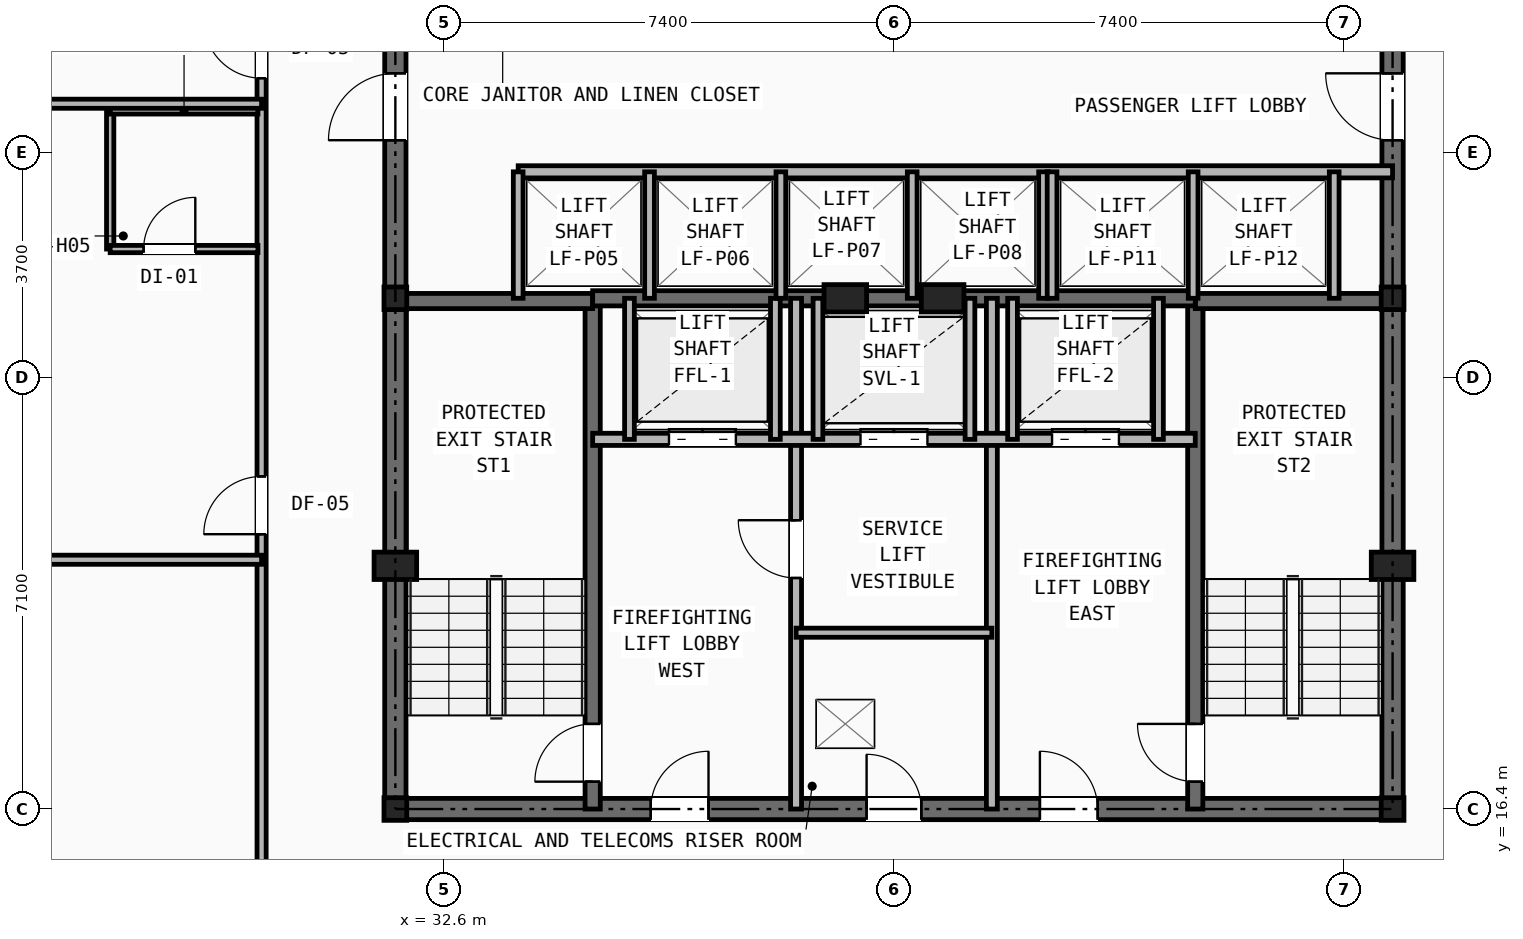
"""IFC4 building model, lengths in metres.
Left out: names, types, materials, properties, quantities, classifications, styles, units other than length and angle.
Written with IfcOpenShell. Run it as: python <this file> out.ifc"""

import sys

from ifc_helpers import new_model, si_unit, direction, frame, frame_2d, origin, origin_2d, place, context, subcontext, project, spatial, rectangle, i_section, extrude, element, fill, save


model = new_model("IFC4")
c1 = context("Model", 3, precision=1e-05, world=origin(), true_north=direction((0.0, 1.0)))
c2 = subcontext(c1, "Body", "Model", "MODEL_VIEW")
j1 = project(units=[si_unit("LENGTHUNIT", "METRE"), si_unit("PLANEANGLEUNIT", "RADIAN")], contexts=[c1])
p1 = place(None, origin())
s1 = spatial("IfcSite", under=j1, at=p1, CompositionType="ELEMENT")
p2 = place(p1, origin())
s2 = spatial("IfcBuilding", under=s1, at=p2, CompositionType="ELEMENT")
p3 = place(p2, frame((0.0, 0.0, 30.4)))
s3 = spatial("IfcBuildingStorey", under=s2, at=p3, CompositionType="ELEMENT", Elevation=30.4)
for number, where, z_axis, x_axis in (
    (1, (31.8, 16.4, 0.0), (0.0, 0.0, 1.0), (1.0, 0.0, 0.0)),
    (2, (48.2, 16.4, 0.0), (0.0, 0.0, 1.0), (1.0, 0.0, 0.0)),
    (3, (31.8, 24.8, 0.0), (0.0, 0.0, 1.0), (1.0, 0.0, 0.0)),
    (4, (48.2, 24.8, 0.0), (0.0, 0.0, 1.0), (1.0, 0.0, 0.0)),
):
    element("IfcColumn", number, at=place(p3, frame(where, z_axis=z_axis, x_axis=x_axis)), inside=s3, PredefinedType="COLUMN", context=c2, shape_type="SweptSolid", body=[
        extrude(i_section(OverallWidth=0.374, OverallDepth=0.372, WebThickness=0.016, FlangeThickness=0.026, at=origin_2d()), origin(), (0.0, 0.0, 1.0), 3.2),
    ])
for number, where, z_axis, x_axis in (
    (5, (31.8, 20.4, 0.0), (0.0, 0.0, 1.0), (1.0, 0.0, 0.0)),
    (6, (48.2, 20.4, 0.0), (0.0, 0.0, 1.0), (1.0, 0.0, 0.0)),
    (7, (39.2, 24.8, 0.0), (0.0, 0.0, 1.0), (1.0, 0.0, 0.0)),
    (8, (40.8, 24.8, 0.0), (0.0, 0.0, 1.0), (1.0, 0.0, 0.0)),
):
    element("IfcColumn", number, at=place(p3, frame(where, z_axis=z_axis, x_axis=x_axis)), inside=s3, PredefinedType="PILASTER", context=c2, shape_type="SweptSolid", body=[
        extrude(rectangle(XDim=0.7, YDim=0.45, at=origin_2d()), origin(), (0.0, 0.0, 1.0), 3.2),
    ])
p4 = place(p3, frame((31.8, 16.4, 0.0), z_axis=(0.0, 0.0, 1.0), x_axis=(1.0, 0.0, 0.0)))
e9 = element("IfcWall", 9, at=p4, inside=s3, PredefinedType="SHEAR", context=c2, shape_type="SweptSolid", body=[
    extrude(rectangle(XDim=16.4, YDim=0.35, at=frame_2d((8.2, 0.0))), origin(), (0.0, 0.0, 1.0), 2.98),
])
p5 = place(p4, frame((7.75, 0.0, 0.0)))
e10 = element("IfcOpeningElement", 10, at=p5, cuts=e9, PredefinedType="OPENING", context=c2, shape_type="SweptSolid", body=[
    extrude(rectangle(XDim=0.9, YDim=2.1, at=frame_2d((0.45, 1.05))), frame((0.0, 0.185, 0.0), z_axis=(0.0, -1.0, 0.0), x_axis=(1.0, 0.0, 0.0)), (0.0, 0.0, 1.0), 0.37),
])
p6 = place(p4, frame((4.2, 0.0, 0.0)))
e11 = element("IfcOpeningElement", 11, at=p6, cuts=e9, PredefinedType="OPENING", context=c2, shape_type="SweptSolid", body=[
    extrude(rectangle(XDim=0.95, YDim=2.1, at=frame_2d((0.475, 1.05))), frame((0.0, 0.185, 0.0), z_axis=(0.0, -1.0, 0.0), x_axis=(1.0, 0.0, 0.0)), (0.0, 0.0, 1.0), 0.37),
])
p7 = place(p4, frame((10.6, 0.0, 0.0)))
e12 = element("IfcOpeningElement", 12, at=p7, cuts=e9, PredefinedType="OPENING", context=c2, shape_type="SweptSolid", body=[
    extrude(rectangle(XDim=0.95, YDim=2.1, at=frame_2d((0.475, 1.05))), frame((0.0, 0.185, 0.0), z_axis=(0.0, -1.0, 0.0), x_axis=(1.0, 0.0, 0.0)), (0.0, 0.0, 1.0), 0.37),
])
p8 = place(p3, frame((31.8, 16.4, 0.0), z_axis=(0.0, 0.0, 1.0), x_axis=(0.0, 1.0, 0.0)))
e13 = element("IfcWall", 13, at=p8, inside=s3, PredefinedType="SHEAR", context=c2, shape_type="SweptSolid", body=[
    extrude(rectangle(XDim=14.8, YDim=0.35, at=frame_2d((7.4, 0.0))), origin(), (0.0, 0.0, 1.0), 2.98),
])
p9 = place(p8, frame((11.0, 0.0, 0.0)))
e14 = element("IfcOpeningElement", 14, at=p9, cuts=e13, PredefinedType="OPENING", context=c2, shape_type="SweptSolid", body=[
    extrude(rectangle(XDim=1.1, YDim=2.15, at=frame_2d((0.55, 1.075))), frame((0.0, 0.185, 0.0), z_axis=(0.0, -1.0, 0.0), x_axis=(1.0, 0.0, 0.0)), (0.0, 0.0, 1.0), 0.37),
])
p10 = place(p3, frame((48.2, 16.4, 0.0), z_axis=(0.0, 0.0, 1.0), x_axis=(0.0, 1.0, 0.0)))
e15 = element("IfcWall", 15, at=p10, inside=s3, PredefinedType="SHEAR", context=c2, shape_type="SweptSolid", body=[
    extrude(rectangle(XDim=14.8, YDim=0.35, at=frame_2d((7.4, 0.0))), origin(), (0.0, 0.0, 1.0), 2.98),
])
p11 = place(p10, frame((11.0, 0.0, 0.0)))
e16 = element("IfcOpeningElement", 16, at=p11, cuts=e15, PredefinedType="OPENING", context=c2, shape_type="SweptSolid", body=[
    extrude(rectangle(XDim=1.1, YDim=2.15, at=frame_2d((0.55, 1.075))), frame((0.0, 0.185, 0.0), z_axis=(0.0, -1.0, 0.0), x_axis=(1.0, 0.0, 0.0)), (0.0, 0.0, 1.0), 0.37),
])
p12 = place(p3, frame((35.045, 16.4, 0.0), z_axis=(0.0, 0.0, 1.0), x_axis=(0.0, 1.0, 0.0)))
e17 = element("IfcWall", 17, at=p12, inside=s3, PredefinedType="SHEAR", context=c2, shape_type="SweptSolid", body=[
    extrude(rectangle(XDim=8.4, YDim=0.25, at=frame_2d((4.2, 0.0))), origin(), (0.0, 0.0, 1.0), 2.98),
])
p13 = place(p12, frame((0.45, 0.0, 0.0)))
e18 = element("IfcOpeningElement", 18, at=p13, cuts=e17, PredefinedType="OPENING", context=c2, shape_type="SweptSolid", body=[
    extrude(rectangle(XDim=0.95, YDim=2.1, at=frame_2d((0.475, 1.05))), frame((0.0, 0.135, 0.0), z_axis=(0.0, -1.0, 0.0), x_axis=(1.0, 0.0, 0.0)), (0.0, 0.0, 1.0), 0.27),
])
p14 = place(p3, frame((31.8, 24.755, 0.0), z_axis=(0.0, 0.0, 1.0), x_axis=(1.0, 0.0, 0.0)))
e19 = element("IfcWall", 19, at=p14, inside=s3, PredefinedType="SHEAR", context=c2, shape_type="SweptSolid", body=[
    extrude(rectangle(XDim=3.245, YDim=0.25, at=frame_2d((1.623, 0.0))), origin(), (0.0, 0.0, 1.0), 2.98),
])
p15 = place(p3, frame((44.955, 16.4, 0.0), z_axis=(0.0, 0.0, 1.0), x_axis=(0.0, 1.0, 0.0)))
e20 = element("IfcWall", 20, at=p15, inside=s3, PredefinedType="SHEAR", context=c2, shape_type="SweptSolid", body=[
    extrude(rectangle(XDim=8.4, YDim=0.25, at=frame_2d((4.2, 0.0))), origin(), (0.0, 0.0, 1.0), 2.98),
])
p16 = place(p15, frame((0.45, 0.0, 0.0)))
e21 = element("IfcOpeningElement", 21, at=p16, cuts=e20, PredefinedType="OPENING", context=c2, shape_type="SweptSolid", body=[
    extrude(rectangle(XDim=0.95, YDim=2.1, at=frame_2d((0.475, 1.05))), frame((0.0, 0.135, 0.0), z_axis=(0.0, -1.0, 0.0), x_axis=(1.0, 0.0, 0.0)), (0.0, 0.0, 1.0), 0.27),
])
p17 = place(p3, frame((44.955, 24.755, 0.0), z_axis=(0.0, 0.0, 1.0), x_axis=(1.0, 0.0, 0.0)))
e22 = element("IfcWall", 22, at=p17, inside=s3, PredefinedType="SHEAR", context=c2, shape_type="SweptSolid", body=[
    extrude(rectangle(XDim=3.245, YDim=0.25, at=frame_2d((1.623, 0.0))), origin(), (0.0, 0.0, 1.0), 2.98),
])
p18 = place(p3, frame((35.045, 24.8, 0.0), z_axis=(0.0, 0.0, 1.0), x_axis=(1.0, 0.0, 0.0)))
e23 = element("IfcWall", 23, at=p18, inside=s3, PredefinedType="SHEAR", context=c2, shape_type="SweptSolid", body=[
    extrude(rectangle(XDim=9.91, YDim=0.25, at=frame_2d((4.955, 0.0))), origin(), (0.0, 0.0, 1.0), 2.98),
])
p19 = place(p3, frame((38.39, 16.4, 0.0), z_axis=(0.0, 0.0, 1.0), x_axis=(0.0, 1.0, 0.0)))
e24 = element("IfcWall", 24, at=p19, inside=s3, PredefinedType="PARTITIONING", context=c2, shape_type="SweptSolid", body=[
    extrude(rectangle(XDim=8.4, YDim=0.18, at=frame_2d((4.2, 0.0))), origin(), (0.0, 0.0, 1.0), 2.431),
])
p20 = place(p19, frame((3.8, 0.0, 0.0)))
e25 = element("IfcOpeningElement", 25, at=p20, cuts=e24, PredefinedType="OPENING", context=c2, shape_type="SweptSolid", body=[
    extrude(rectangle(XDim=0.95, YDim=2.1, at=frame_2d((0.475, 1.05))), frame((0.0, 0.1, 0.0), z_axis=(0.0, -1.0, 0.0), x_axis=(1.0, 0.0, 0.0)), (0.0, 0.0, 1.0), 0.2),
])
p21 = place(p3, frame((41.61, 16.4, 0.0), z_axis=(0.0, 0.0, 1.0), x_axis=(0.0, 1.0, 0.0)))
e26 = element("IfcWall", 26, at=p21, inside=s3, PredefinedType="PARTITIONING", context=c2, shape_type="SweptSolid", body=[
    extrude(rectangle(XDim=8.4, YDim=0.18, at=frame_2d((4.2, 0.0))), origin(), (0.0, 0.0, 1.0), 2.431),
])
p22 = place(p3, frame((35.045, 22.48, 0.0), z_axis=(0.0, 0.0, 1.0), x_axis=(1.0, 0.0, 0.0)))
e27 = element("IfcWall", 27, at=p22, inside=s3, PredefinedType="SOLIDWALL", context=c2, shape_type="SweptSolid", body=[
    extrude(rectangle(XDim=9.91, YDim=0.2, at=frame_2d((4.955, 0.0))), origin(), (0.0, 0.0, 1.0), 2.98),
])
p23 = place(p22, frame((1.255, 0.0, 0.0)))
e28 = element("IfcOpeningElement", 28, at=p23, cuts=e27, PredefinedType="OPENING", context=c2, shape_type="SweptSolid", body=[
    extrude(rectangle(XDim=1.1, YDim=2.15, at=frame_2d((0.55, 1.075))), frame((0.0, 0.11, 0.0), z_axis=(0.0, -1.0, 0.0), x_axis=(1.0, 0.0, 0.0)), (0.0, 0.0, 1.0), 0.22),
])
p24 = place(p22, frame((7.555, 0.0, 0.0)))
e29 = element("IfcOpeningElement", 29, at=p24, cuts=e27, PredefinedType="OPENING", context=c2, shape_type="SweptSolid", body=[
    extrude(rectangle(XDim=1.1, YDim=2.15, at=frame_2d((0.55, 1.075))), frame((0.0, 0.11, 0.0), z_axis=(0.0, -1.0, 0.0), x_axis=(1.0, 0.0, 0.0)), (0.0, 0.0, 1.0), 0.22),
])
p25 = place(p22, frame((4.405, 0.0, 0.0)))
e30 = element("IfcOpeningElement", 30, at=p25, cuts=e27, PredefinedType="OPENING", context=c2, shape_type="SweptSolid", body=[
    extrude(rectangle(XDim=1.1, YDim=2.15, at=frame_2d((0.55, 1.075))), frame((0.0, 0.11, 0.0), z_axis=(0.0, -1.0, 0.0), x_axis=(1.0, 0.0, 0.0)), (0.0, 0.0, 1.0), 0.22),
])
p26 = place(p3, frame((38.39, 19.3, 0.0), z_axis=(0.0, 0.0, 1.0), x_axis=(1.0, 0.0, 0.0)))
e31 = element("IfcWall", 31, at=p26, inside=s3, PredefinedType="PARTITIONING", context=c2, shape_type="SweptSolid", body=[
    extrude(rectangle(XDim=3.22, YDim=0.15, at=frame_2d((1.61, 0.0))), origin(), (0.0, 0.0, 1.0), 2.98),
])
for number, where, z_axis, x_axis in (
    (32, (35.65, 22.48, 0.0), (0.0, 0.0, 1.0), (0.0, 1.0, 0.0)),
    (33, (38.05, 22.48, 0.0), (0.0, 0.0, 1.0), (0.0, 1.0, 0.0)),
    (34, (41.95, 22.48, 0.0), (0.0, 0.0, 1.0), (0.0, 1.0, 0.0)),
    (35, (44.35, 22.48, 0.0), (0.0, 0.0, 1.0), (0.0, 1.0, 0.0)),
    (36, (38.75, 22.48, 0.0), (0.0, 0.0, 1.0), (0.0, 1.0, 0.0)),
    (37, (41.25, 22.48, 0.0), (0.0, 0.0, 1.0), (0.0, 1.0, 0.0)),
):
    element("IfcWall", number, at=place(p3, frame(where, z_axis=z_axis, x_axis=x_axis)), inside=s3, PredefinedType="SOLIDWALL", context=c2, shape_type="SweptSolid", body=[
        extrude(rectangle(XDim=2.32, YDim=0.16, at=frame_2d((1.16, 0.0))), origin(), (0.0, 0.0, 1.0), 2.98),
    ])
p27 = place(p3, frame((33.82, 26.88, 0.0), z_axis=(0.0, 0.0, 1.0), x_axis=(1.0, 0.0, 0.0)))
e38 = element("IfcWall", 38, at=p27, inside=s3, PredefinedType="SOLIDWALL", context=c2, shape_type="SweptSolid", body=[
    extrude(rectangle(XDim=14.38, YDim=0.2, at=frame_2d((7.19, 0.0))), origin(), (0.0, 0.0, 1.0), 2.431),
])
for number, where, z_axis, x_axis in (
    (39, (33.82, 24.8, 0.0), (0.0, 0.0, 1.0), (0.0, 1.0, 0.0)),
    (40, (35.98, 24.8, 0.0), (0.0, 0.0, 1.0), (0.0, 1.0, 0.0)),
    (41, (38.14, 24.8, 0.0), (0.0, 0.0, 1.0), (0.0, 1.0, 0.0)),
    (42, (40.3, 24.8, 0.0), (0.0, 0.0, 1.0), (0.0, 1.0, 0.0)),
    (43, (42.46, 24.8, 0.0), (0.0, 0.0, 1.0), (0.0, 1.0, 0.0)),
    (44, (42.6, 24.8, 0.0), (0.0, 0.0, 1.0), (0.0, 1.0, 0.0)),
    (45, (44.92, 24.8, 0.0), (0.0, 0.0, 1.0), (0.0, 1.0, 0.0)),
    (46, (47.24, 24.8, 0.0), (0.0, 0.0, 1.0), (0.0, 1.0, 0.0)),
):
    element("IfcWall", number, at=place(p3, frame(where, z_axis=z_axis, x_axis=x_axis)), inside=s3, PredefinedType="SOLIDWALL", context=c2, shape_type="SweptSolid", body=[
        extrude(rectangle(XDim=2.08, YDim=0.16, at=frame_2d((1.04, 0.0))), origin(), (0.0, 0.0, 1.0), 2.98),
    ])
p28 = place(p3, frame((29.6, 14.1, 0.0), z_axis=(0.0, 0.0, 1.0), x_axis=(0.0, 1.0, 0.0)))
e47 = element("IfcWall", 47, at=p28, inside=s3, PredefinedType="PARTITIONING", context=c2, shape_type="SweptSolid", body=[
    extrude(rectangle(XDim=21.9, YDim=0.15, at=frame_2d((10.95, 0.0))), origin(), (0.0, 0.0, 1.0), 2.431),
])
p29 = place(p28, frame((0.42, 0.0, 0.0)))
e48 = element("IfcOpeningElement", 48, at=p29, cuts=e47, PredefinedType="OPENING", context=c2, shape_type="SweptSolid", body=[
    extrude(rectangle(XDim=0.95, YDim=2.1, at=frame_2d((0.475, 1.05))), frame((0.0, 0.085, 0.0), z_axis=(0.0, -1.0, 0.0), x_axis=(1.0, 0.0, 0.0)), (0.0, 0.0, 1.0), 0.17),
])
p30 = place(p28, frame((6.82, 0.0, 0.0)))
e49 = element("IfcOpeningElement", 49, at=p30, cuts=e47, PredefinedType="OPENING", context=c2, shape_type="SweptSolid", body=[
    extrude(rectangle(XDim=0.95, YDim=2.1, at=frame_2d((0.475, 1.05))), frame((0.0, 0.085, 0.0), z_axis=(0.0, -1.0, 0.0), x_axis=(1.0, 0.0, 0.0)), (0.0, 0.0, 1.0), 0.17),
])
p31 = place(p28, frame((14.32, 0.0, 0.0)))
e50 = element("IfcOpeningElement", 50, at=p31, cuts=e47, PredefinedType="OPENING", context=c2, shape_type="SweptSolid", body=[
    extrude(rectangle(XDim=0.95, YDim=2.1, at=frame_2d((0.475, 1.05))), frame((0.0, 0.085, 0.0), z_axis=(0.0, -1.0, 0.0), x_axis=(1.0, 0.0, 0.0)), (0.0, 0.0, 1.0), 0.17),
])
p32 = place(p3, frame((14.56, 20.5, 0.0), z_axis=(0.0, 0.0, 1.0), x_axis=(1.0, 0.0, 0.0)))
e51 = element("IfcWall", 51, at=p32, inside=s3, PredefinedType="PARTITIONING", context=c2, shape_type="SweptSolid", body=[
    extrude(rectangle(XDim=15.041, YDim=0.15, at=frame_2d((7.52, 0.0))), origin(), (0.0, 0.0, 1.0), 2.268),
])
p33 = place(p3, frame((27.11, 25.61, 0.0), z_axis=(0.0, 0.0, 1.0), x_axis=(0.0, 1.0, 0.0)))
e52 = element("IfcWall", 52, at=p33, inside=s3, PredefinedType="PARTITIONING", context=c2, shape_type="SweptSolid", body=[
    extrude(rectangle(XDim=2.28, YDim=0.12, at=frame_2d((1.14, 0.0))), origin(), (0.0, 0.0, 1.0), 2.98),
])
p34 = place(p3, frame((27.11, 25.61, 0.0), z_axis=(0.0, 0.0, 1.0), x_axis=(1.0, 0.0, 0.0)))
e53 = element("IfcWall", 53, at=p34, inside=s3, PredefinedType="PARTITIONING", context=c2, shape_type="SweptSolid", body=[
    extrude(rectangle(XDim=2.43, YDim=0.12, at=frame_2d((1.215, 0.0))), origin(), (0.0, 0.0, 1.0), 2.98),
])
p35 = place(p34, frame((0.55, 0.0, 0.0)))
e54 = element("IfcOpeningElement", 54, at=p35, cuts=e53, PredefinedType="OPENING", context=c2, shape_type="SweptSolid", body=[
    extrude(rectangle(XDim=0.85, YDim=2.05, at=frame_2d((0.425, 1.025))), frame((0.0, 0.07, 0.0), z_axis=(0.0, -1.0, 0.0), x_axis=(1.0, 0.0, 0.0)), (0.0, 0.0, 1.0), 0.14),
])
p36 = place(p3, frame((27.11, 27.89, 0.0), z_axis=(0.0, 0.0, 1.0), x_axis=(1.0, 0.0, 0.0)))
e55 = element("IfcWall", 55, at=p36, inside=s3, PredefinedType="PARTITIONING", context=c2, shape_type="SweptSolid", body=[
    extrude(rectangle(XDim=2.43, YDim=0.12, at=frame_2d((1.215, 0.0))), origin(), (0.0, 0.0, 1.0), 2.98),
])
p37 = place(p3, frame((17.938, 28.0, 0.0), z_axis=(0.0, 0.0, 1.0), x_axis=(1.0, 0.0, 0.0)))
e56 = element("IfcWall", 56, at=p37, inside=s3, PredefinedType="PARTITIONING", context=c2, shape_type="SweptSolid", body=[
    extrude(rectangle(XDim=11.662, YDim=0.15, at=frame_2d((5.831, 0.0))), origin(), (0.0, 0.0, 1.0), 2.268),
])
p38 = place(p5, origin())
e57 = element("IfcDoor", 57, at=p38, inside=s3, OperationType="SINGLE_SWING_LEFT", PredefinedType="DOOR", context=c2, shape_type="SweptSolid", body=[
    extrude(rectangle(XDim=0.9, YDim=2.1, at=frame_2d((0.45, 1.05))), frame((0.0, 0.025, 0.0), z_axis=(0.0, -1.0, 0.0), x_axis=(1.0, 0.0, 0.0)), (0.0, 0.0, 1.0), 0.05),
])
fill(e10, e57)
p39 = place(p20, origin())
e58 = element("IfcDoor", 58, at=p39, inside=s3, OperationType="SINGLE_SWING_RIGHT", PredefinedType="DOOR", context=c2, shape_type="SweptSolid", body=[
    extrude(rectangle(XDim=0.95, YDim=2.1, at=frame_2d((0.475, 1.05))), frame((0.0, 0.025, 0.0), z_axis=(0.0, -1.0, 0.0), x_axis=(1.0, 0.0, 0.0)), (0.0, 0.0, 1.0), 0.05),
])
fill(e25, e58)
p40 = place(p13, origin())
e59 = element("IfcDoor", 59, at=p40, inside=s3, OperationType="SINGLE_SWING_LEFT", PredefinedType="DOOR", context=c2, shape_type="SweptSolid", body=[
    extrude(rectangle(XDim=0.95, YDim=2.1, at=frame_2d((0.475, 1.05))), frame((0.0, 0.025, 0.0), z_axis=(0.0, -1.0, 0.0), x_axis=(1.0, 0.0, 0.0)), (0.0, 0.0, 1.0), 0.05),
])
fill(e18, e59)
p41 = place(p16, origin())
e60 = element("IfcDoor", 60, at=p41, inside=s3, OperationType="SINGLE_SWING_RIGHT", PredefinedType="DOOR", context=c2, shape_type="SweptSolid", body=[
    extrude(rectangle(XDim=0.95, YDim=2.1, at=frame_2d((0.475, 1.05))), frame((0.0, 0.025, 0.0), z_axis=(0.0, -1.0, 0.0), x_axis=(1.0, 0.0, 0.0)), (0.0, 0.0, 1.0), 0.05),
])
fill(e21, e60)
p42 = place(p6, origin())
e61 = element("IfcDoor", 61, at=p42, inside=s3, OperationType="SINGLE_SWING_RIGHT", PredefinedType="DOOR", context=c2, shape_type="SweptSolid", body=[
    extrude(rectangle(XDim=0.95, YDim=2.1, at=frame_2d((0.475, 1.05))), frame((0.0, 0.025, 0.0), z_axis=(0.0, -1.0, 0.0), x_axis=(1.0, 0.0, 0.0)), (0.0, 0.0, 1.0), 0.05),
])
fill(e11, e61)
p43 = place(p7, origin())
e62 = element("IfcDoor", 62, at=p43, inside=s3, OperationType="SINGLE_SWING_LEFT", PredefinedType="DOOR", context=c2, shape_type="SweptSolid", body=[
    extrude(rectangle(XDim=0.95, YDim=2.1, at=frame_2d((0.475, 1.05))), frame((0.0, 0.025, 0.0), z_axis=(0.0, -1.0, 0.0), x_axis=(1.0, 0.0, 0.0)), (0.0, 0.0, 1.0), 0.05),
])
fill(e12, e62)
p44 = place(p23, origin())
e63 = element("IfcDoor", 63, at=p44, inside=s3, OperationType="DOUBLE_DOOR_SLIDING", PredefinedType="DOOR", context=c2, shape_type="SweptSolid", body=[
    extrude(rectangle(XDim=1.1, YDim=2.15, at=frame_2d((0.55, 1.075))), frame((0.0, 0.025, 0.0), z_axis=(0.0, -1.0, 0.0), x_axis=(1.0, 0.0, 0.0)), (0.0, 0.0, 1.0), 0.05),
])
fill(e28, e63)
p45 = place(p24, origin())
e64 = element("IfcDoor", 64, at=p45, inside=s3, OperationType="DOUBLE_DOOR_SLIDING", PredefinedType="DOOR", context=c2, shape_type="SweptSolid", body=[
    extrude(rectangle(XDim=1.1, YDim=2.15, at=frame_2d((0.55, 1.075))), frame((0.0, 0.025, 0.0), z_axis=(0.0, -1.0, 0.0), x_axis=(1.0, 0.0, 0.0)), (0.0, 0.0, 1.0), 0.05),
])
fill(e29, e64)
p46 = place(p25, origin())
e65 = element("IfcDoor", 65, at=p46, inside=s3, OperationType="DOUBLE_DOOR_SLIDING", PredefinedType="DOOR", context=c2, shape_type="SweptSolid", body=[
    extrude(rectangle(XDim=1.1, YDim=2.15, at=frame_2d((0.55, 1.075))), frame((0.0, 0.025, 0.0), z_axis=(0.0, -1.0, 0.0), x_axis=(1.0, 0.0, 0.0)), (0.0, 0.0, 1.0), 0.05),
])
fill(e30, e65)
p47 = place(p9, origin())
e66 = element("IfcDoor", 66, at=p47, inside=s3, OperationType="SINGLE_SWING_LEFT", PredefinedType="DOOR", context=c2, shape_type="SweptSolid", body=[
    extrude(rectangle(XDim=1.1, YDim=2.15, at=frame_2d((0.55, 1.075))), frame((0.0, 0.025, 0.0), z_axis=(0.0, -1.0, 0.0), x_axis=(1.0, 0.0, 0.0)), (0.0, 0.0, 1.0), 0.05),
])
fill(e14, e66)
p48 = place(p11, origin())
e67 = element("IfcDoor", 67, at=p48, inside=s3, OperationType="SINGLE_SWING_RIGHT", PredefinedType="DOOR", context=c2, shape_type="SweptSolid", body=[
    extrude(rectangle(XDim=1.1, YDim=2.15, at=frame_2d((0.55, 1.075))), frame((0.0, 0.025, 0.0), z_axis=(0.0, -1.0, 0.0), x_axis=(1.0, 0.0, 0.0)), (0.0, 0.0, 1.0), 0.05),
])
fill(e16, e67)
p49 = place(p30, origin())
e68 = element("IfcDoor", 68, at=p49, inside=s3, OperationType="SINGLE_SWING_LEFT", PredefinedType="DOOR", context=c2, shape_type="SweptSolid", body=[
    extrude(rectangle(XDim=0.95, YDim=2.1, at=frame_2d((0.475, 1.05))), frame((0.0, 0.025, 0.0), z_axis=(0.0, -1.0, 0.0), x_axis=(1.0, 0.0, 0.0)), (0.0, 0.0, 1.0), 0.05),
])
fill(e49, e68)
p50 = place(p35, origin())
e69 = element("IfcDoor", 69, at=p50, inside=s3, OperationType="SINGLE_SWING_RIGHT", PredefinedType="DOOR", context=c2, shape_type="SweptSolid", body=[
    extrude(rectangle(XDim=0.85, YDim=2.05, at=frame_2d((0.425, 1.025))), frame((0.0, 0.025, 0.0), z_axis=(0.0, -1.0, 0.0), x_axis=(1.0, 0.0, 0.0)), (0.0, 0.0, 1.0), 0.05),
])
fill(e54, e69)
p51 = place(p31, origin())
e70 = element("IfcDoor", 70, at=p51, inside=s3, OperationType="SINGLE_SWING_RIGHT", PredefinedType="DOOR", context=c2, shape_type="SweptSolid", body=[
    extrude(rectangle(XDim=0.95, YDim=2.1, at=frame_2d((0.475, 1.05))), frame((0.0, 0.025, 0.0), z_axis=(0.0, -1.0, 0.0), x_axis=(1.0, 0.0, 0.0)), (0.0, 0.0, 1.0), 0.05),
])
fill(e50, e70)
save(model, sys.argv[1])
